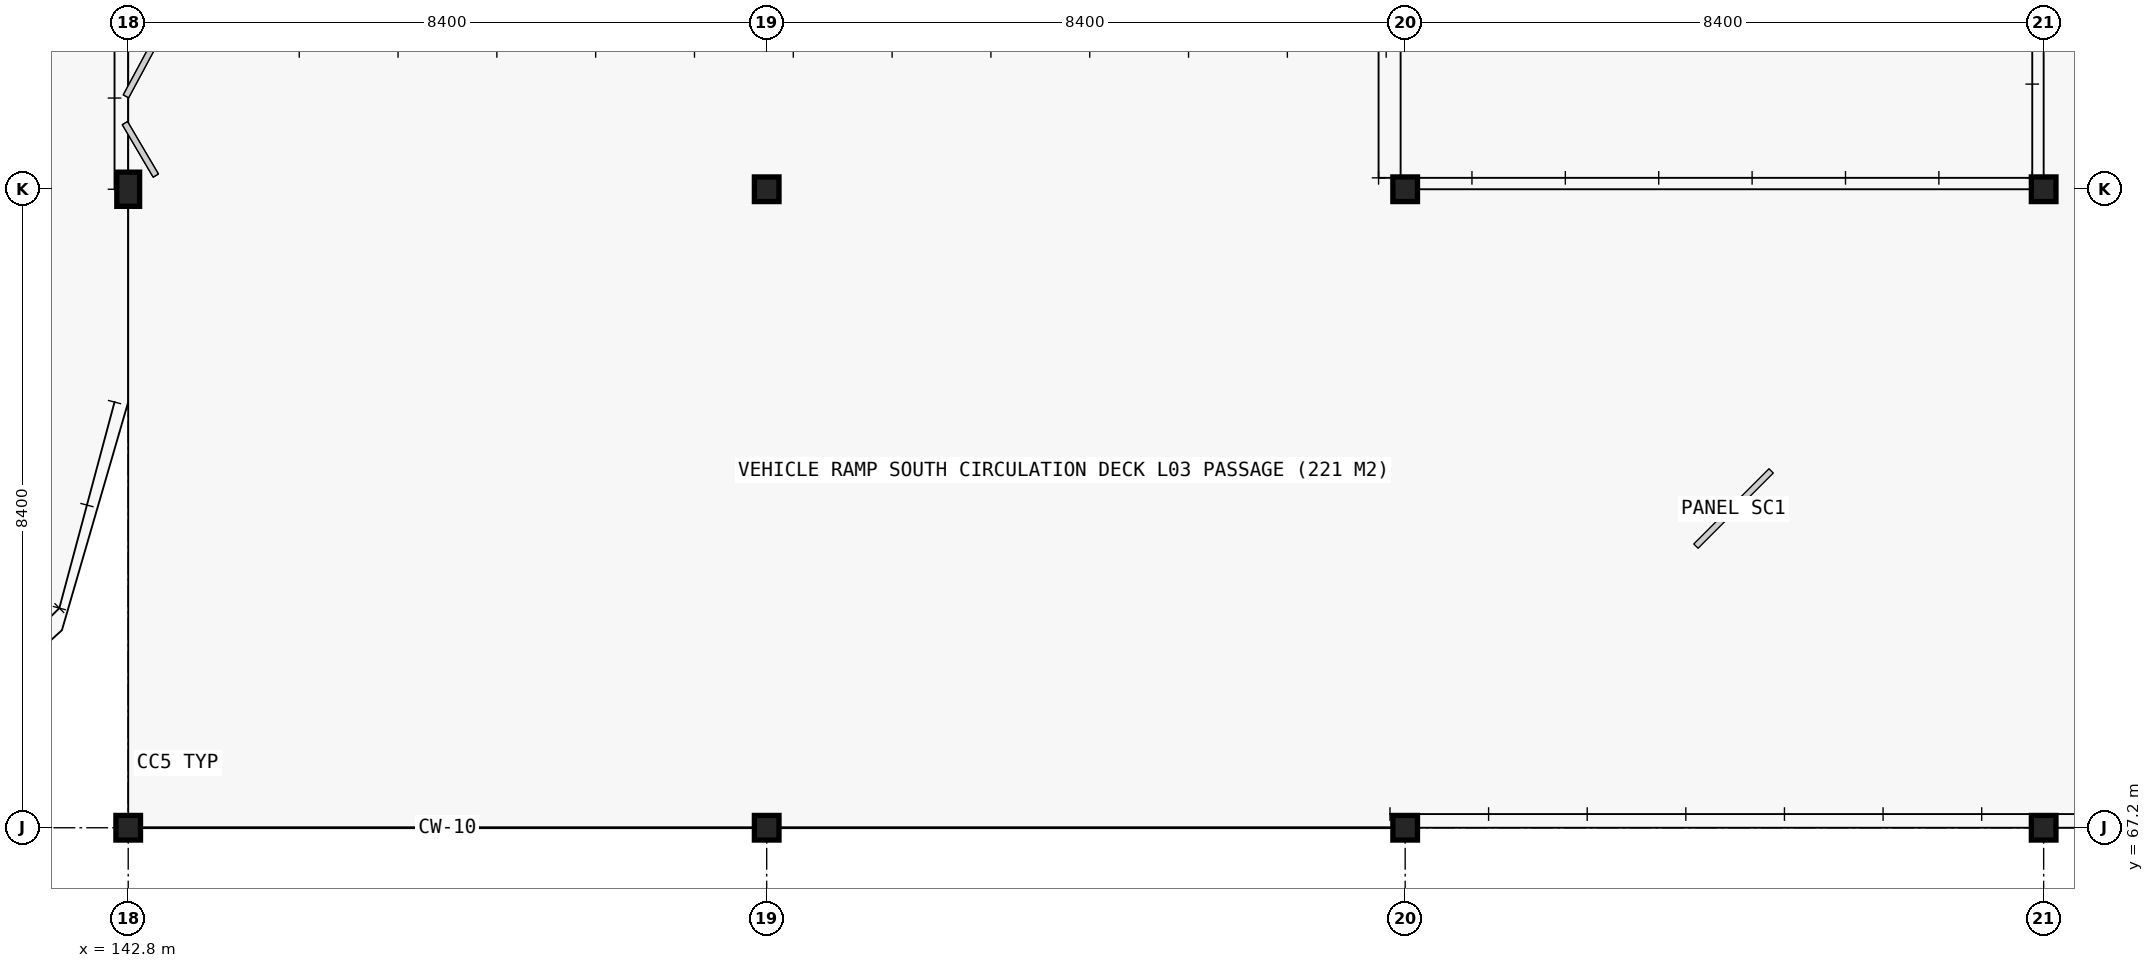
"""IFC4 building model, lengths in metres.
Left out: names, types, materials, properties, quantities, classifications, styles, units other than length and angle.
Written with IfcOpenShell. Run it as: python <this file> out.ifc"""

import sys

from ifc_helpers import new_model, si_unit, direction, frame, origin, origin_2d, place, context, subcontext, project, spatial, hollow_circle, i_section, extrude, element, save


model = new_model("IFC4")
c1 = context("Model", 3, precision=1e-05, world=origin(), true_north=direction((0.0, 1.0)))
c2 = subcontext(c1, "Body", "Model", "MODEL_VIEW")
j1 = project(units=[si_unit("LENGTHUNIT", "METRE"), si_unit("PLANEANGLEUNIT", "RADIAN")], contexts=[c1])
p1 = place(None, origin())
s1 = spatial("IfcSite", under=j1, at=p1, CompositionType="ELEMENT")
p2 = place(p1, origin())
s2 = spatial("IfcBuilding", under=s1, at=p2, CompositionType="ELEMENT")
p3 = place(p2, frame((0.0, 0.0, 13.2)))
s3 = spatial("IfcBuildingStorey", under=s2, at=p3, CompositionType="ELEMENT", Elevation=13.2)
p4 = place(p3, frame((142.8, 67.2, 0.0), z_axis=(0.0, 0.0, 1.0), x_axis=(1.0, 0.0, 0.0)))
e1 = element("IfcColumn", 1, at=p4, inside=s3, PredefinedType="COLUMN", context=c2, shape_type="SweptSolid", body=[
    extrude(hollow_circle(Radius=0.162, WallThickness=0.01, at=origin_2d()), origin(), (0.0, 0.0, 1.0), 4.2),
])
p5 = place(p3, frame((142.8, 75.6, 0.0), z_axis=(0.0, 0.0, 1.0), x_axis=(1.0, 0.0, 0.0)))
e2 = element("IfcColumn", 2, at=p5, inside=s3, PredefinedType="COLUMN", context=c2, shape_type="SweptSolid", body=[
    extrude(i_section(OverallWidth=0.3, OverallDepth=0.45, WebThickness=0.014, FlangeThickness=0.026, FilletRadius=0.027, at=origin_2d()), origin(), (0.0, 0.0, 1.0), 4.2),
])
for number, where, z_axis, x_axis in (
    (3, (151.2, 67.2, 0.0), (0.0, 0.0, 1.0), (1.0, 0.0, 0.0)),
    (4, (151.2, 75.6, 0.0), (0.0, 0.0, 1.0), (1.0, 0.0, 0.0)),
    (5, (159.6, 67.2, 0.0), (0.0, 0.0, 1.0), (1.0, 0.0, 0.0)),
    (6, (159.6, 75.6, 0.0), (0.0, 0.0, 1.0), (1.0, 0.0, 0.0)),
    (7, (168.0, 67.2, 0.0), (0.0, 0.0, 1.0), (1.0, 0.0, 0.0)),
    (8, (168.0, 75.6, 0.0), (0.0, 0.0, 1.0), (1.0, 0.0, 0.0)),
):
    element("IfcColumn", number, at=place(p3, frame(where, z_axis=z_axis, x_axis=x_axis)), inside=s3, PredefinedType="COLUMN", context=c2, shape_type="SweptSolid", body=[
        extrude(hollow_circle(Radius=0.162, WallThickness=0.01, at=origin_2d()), origin(), (0.0, 0.0, 1.0), 4.2),
    ])
save(model, sys.argv[1])
